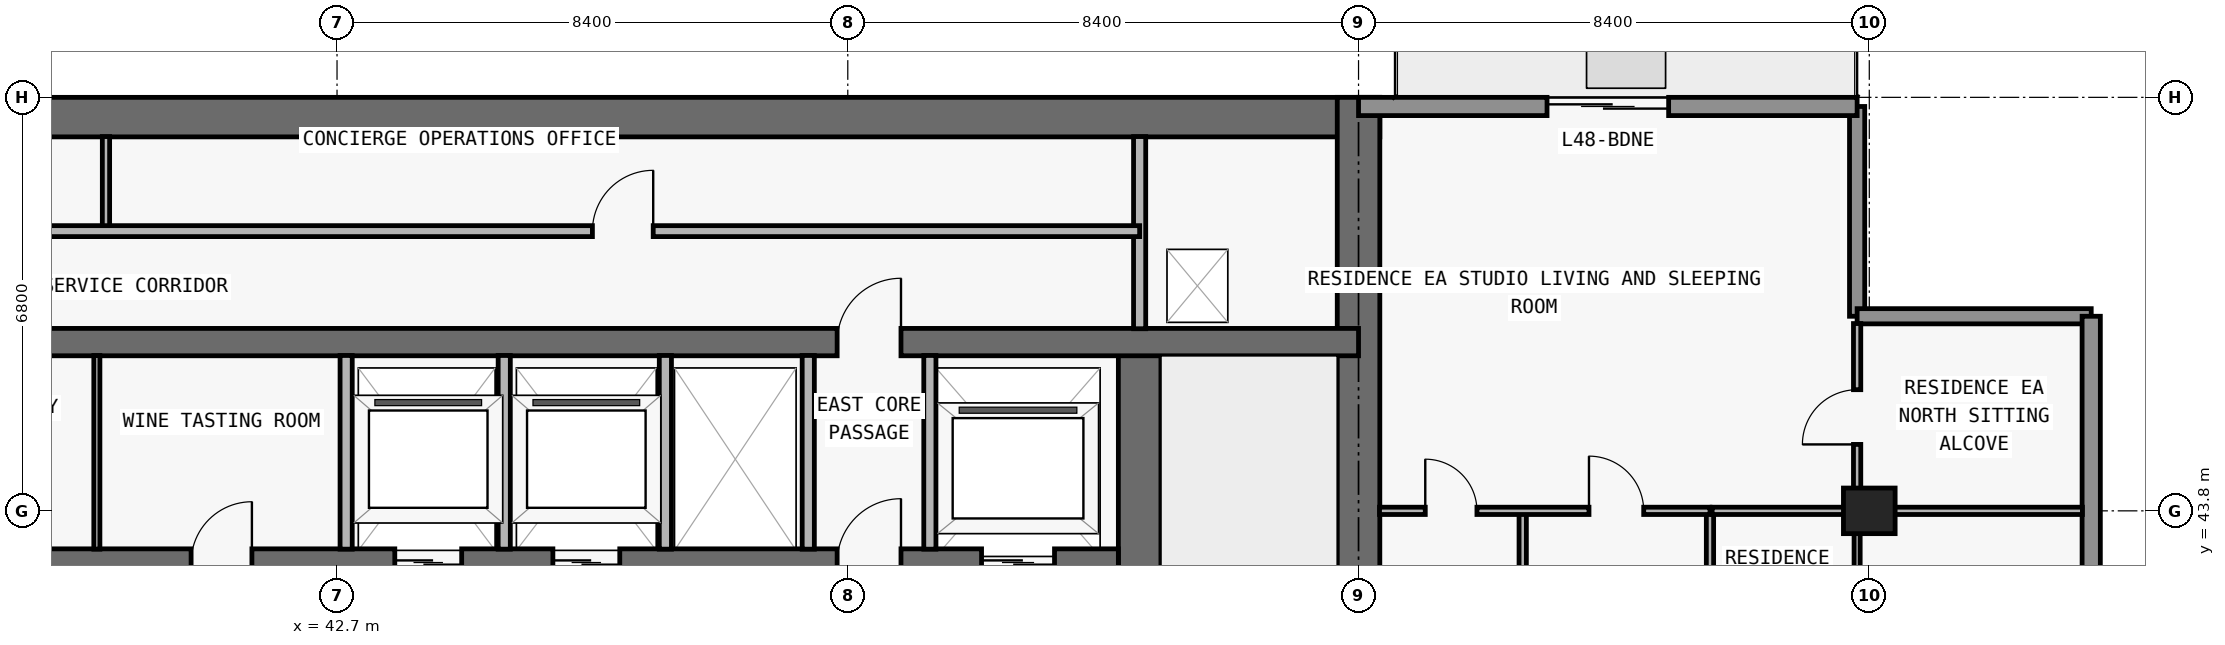
"""IFC4 building model, lengths in metres.
Left out: names, types, materials, properties, quantities, classifications, styles, units other than length and angle.
Written with IfcOpenShell. Run it as: python <this file> out.ifc"""

import sys

from ifc_helpers import new_model, si_unit, direction, frame, frame_2d, origin, origin_2d, place, context, subcontext, project, spatial, rectangle, extrude, element, fill, save


model = new_model("IFC4")
c1 = context("Model", 3, precision=1e-05, world=origin(), true_north=direction((0.0, 1.0)))
c2 = subcontext(c1, "Body", "Model", "MODEL_VIEW")
j1 = project(units=[si_unit("LENGTHUNIT", "METRE"), si_unit("PLANEANGLEUNIT", "RADIAN")], contexts=[c1])
p1 = place(None, origin())
s1 = spatial("IfcSite", under=j1, at=p1, CompositionType="ELEMENT")
p2 = place(p1, origin())
s2 = spatial("IfcBuilding", under=s1, at=p2, CompositionType="ELEMENT")
p3 = place(p2, frame((0.0, 0.0, 173.7)))
s3 = spatial("IfcBuildingStorey", under=s2, at=p3, CompositionType="ELEMENT", Elevation=173.7)
p4 = place(p3, frame((67.9, 43.8, 0.0), z_axis=(0.0, 0.0, 1.0), x_axis=(1.0, 0.0, 0.0)))
e1 = element("IfcColumn", 1, at=p4, inside=s3, PredefinedType="COLUMN", context=c2, shape_type="SweptSolid", body=[
    extrude(rectangle(XDim=0.85, YDim=0.75, at=origin_2d()), origin(), (0.0, 0.0, 1.0), 3.05),
])
p5 = place(p3, frame((17.95, 50.275, 0.0), z_axis=(0.0, 0.0, 1.0), x_axis=(1.0, 0.0, 0.0)))
e2 = element("IfcWall", 2, at=p5, inside=s3, PredefinedType="SHEAR", context=c2, shape_type="SweptSolid", body=[
    extrude(rectangle(XDim=41.9, YDim=0.65, at=frame_2d((20.95, 0.0))), origin(), (0.0, 0.0, 1.0), 3.05),
])
p6 = place(p3, frame((59.5, 36.65, 0.0), z_axis=(0.0, 0.0, 1.0), x_axis=(0.0, 1.0, 0.0)))
e3 = element("IfcWall", 3, at=p6, inside=s3, PredefinedType="SHEAR", context=c2, shape_type="SweptSolid", body=[
    extrude(rectangle(XDim=13.95, YDim=0.7, at=frame_2d((6.975, 0.0))), origin(), (0.0, 0.0, 1.0), 3.05),
])
p7 = place(p3, frame((55.9, 37.0, 0.0), z_axis=(0.0, 0.0, 1.0), x_axis=(0.0, 1.0, 0.0)))
e4 = element("IfcWall", 4, at=p7, inside=s3, PredefinedType="SHEAR", context=c2, shape_type="SweptSolid", body=[
    extrude(rectangle(XDim=9.575, YDim=0.7, at=frame_2d((4.788, 0.0))), origin(), (0.0, 0.0, 1.0), 3.05),
])
p8 = place(p7, frame((0.55, 0.0, 0.0)))
e5 = element("IfcOpeningElement", 5, at=p8, cuts=e4, PredefinedType="OPENING", context=c2, shape_type="SweptSolid", body=[
    extrude(rectangle(XDim=1.1, YDim=2.15, at=frame_2d((0.55, 1.075))), frame((0.0, 0.36, 0.0), z_axis=(0.0, -1.0, 0.0), x_axis=(1.0, 0.0, 0.0)), (0.0, 0.0, 1.0), 0.72),
])
p9 = place(p3, frame((22.25, 42.95, 0.0), z_axis=(0.0, 0.0, 1.0), x_axis=(1.0, 0.0, 0.0)))
e6 = element("IfcWall", 6, at=p9, inside=s3, PredefinedType="SHEAR", context=c2, shape_type="SweptSolid", body=[
    extrude(rectangle(XDim=33.3, YDim=0.45, at=frame_2d((16.65, 0.0))), origin(), (0.0, 0.0, 1.0), 3.05),
])
p10 = place(p9, frame((1.05, 0.0, 0.0)))
e7 = element("IfcOpeningElement", 7, at=p10, cuts=e6, PredefinedType="OPENING", context=c2, shape_type="SweptSolid", body=[
    extrude(rectangle(XDim=1.2, YDim=2.2, at=frame_2d((0.6, 1.1))), frame((0.0, 0.235, 0.0), z_axis=(0.0, -1.0, 0.0), x_axis=(1.0, 0.0, 0.0)), (0.0, 0.0, 1.0), 0.47),
])
p11 = place(p9, frame((31.05, 0.0, 0.0)))
e8 = element("IfcOpeningElement", 8, at=p11, cuts=e6, PredefinedType="OPENING", context=c2, shape_type="SweptSolid", body=[
    extrude(rectangle(XDim=1.2, YDim=2.2, at=frame_2d((0.6, 1.1))), frame((0.0, 0.235, 0.0), z_axis=(0.0, -1.0, 0.0), x_axis=(1.0, 0.0, 0.0)), (0.0, 0.0, 1.0), 0.47),
])
p12 = place(p9, frame((21.4, 0.0, 0.0)))
e9 = element("IfcOpeningElement", 9, at=p12, cuts=e6, PredefinedType="OPENING", context=c2, shape_type="SweptSolid", body=[
    extrude(rectangle(XDim=1.1, YDim=2.2, at=frame_2d((0.55, 1.1))), frame((0.0, 0.235, 0.0), z_axis=(0.0, -1.0, 0.0), x_axis=(1.0, 0.0, 0.0)), (0.0, 0.0, 1.0), 0.47),
])
p13 = place(p9, frame((24.0, 0.0, 0.0)))
e10 = element("IfcOpeningElement", 10, at=p13, cuts=e6, PredefinedType="OPENING", context=c2, shape_type="SweptSolid", body=[
    extrude(rectangle(XDim=1.1, YDim=2.2, at=frame_2d((0.55, 1.1))), frame((0.0, 0.235, 0.0), z_axis=(0.0, -1.0, 0.0), x_axis=(1.0, 0.0, 0.0)), (0.0, 0.0, 1.0), 0.47),
])
p14 = place(p9, frame((3.625, 0.0, 0.0)))
e11 = element("IfcOpeningElement", 11, at=p14, cuts=e6, PredefinedType="OPENING", context=c2, shape_type="SweptSolid", body=[
    extrude(rectangle(XDim=1.05, YDim=2.15, at=frame_2d((0.525, 1.075))), frame((0.0, 0.235, 0.0), z_axis=(0.0, -1.0, 0.0), x_axis=(1.0, 0.0, 0.0)), (0.0, 0.0, 1.0), 0.47),
])
p15 = place(p9, frame((28.675, 0.0, 0.0)))
e12 = element("IfcOpeningElement", 12, at=p15, cuts=e6, PredefinedType="OPENING", context=c2, shape_type="SweptSolid", body=[
    extrude(rectangle(XDim=1.05, YDim=2.15, at=frame_2d((0.525, 1.075))), frame((0.0, 0.235, 0.0), z_axis=(0.0, -1.0, 0.0), x_axis=(1.0, 0.0, 0.0)), (0.0, 0.0, 1.0), 0.47),
])
p16 = place(p9, frame((13.925, 0.0, 0.0)))
e13 = element("IfcOpeningElement", 13, at=p16, cuts=e6, PredefinedType="OPENING", context=c2, shape_type="SweptSolid", body=[
    extrude(rectangle(XDim=1.0, YDim=2.2, at=frame_2d((0.5, 1.1))), frame((0.0, 0.235, 0.0), z_axis=(0.0, -1.0, 0.0), x_axis=(1.0, 0.0, 0.0)), (0.0, 0.0, 1.0), 0.47),
])
p17 = place(p9, frame((18.05, 0.0, 0.0)))
e14 = element("IfcOpeningElement", 14, at=p17, cuts=e6, PredefinedType="OPENING", context=c2, shape_type="SweptSolid", body=[
    extrude(rectangle(XDim=1.0, YDim=2.2, at=frame_2d((0.5, 1.1))), frame((0.0, 0.235, 0.0), z_axis=(0.0, -1.0, 0.0), x_axis=(1.0, 0.0, 0.0)), (0.0, 0.0, 1.0), 0.47),
])
p18 = place(p3, frame((18.3, 46.575, 0.0), z_axis=(0.0, 0.0, 1.0), x_axis=(1.0, 0.0, 0.0)))
e15 = element("IfcWall", 15, at=p18, inside=s3, PredefinedType="SHEAR", context=c2, shape_type="SweptSolid", body=[
    extrude(rectangle(XDim=41.2, YDim=0.45, at=frame_2d((20.6, 0.0))), origin(), (0.0, 0.0, 1.0), 3.05),
])
p19 = place(p18, frame((7.575, 0.0, 0.0)))
e16 = element("IfcOpeningElement", 16, at=p19, cuts=e15, PredefinedType="OPENING", context=c2, shape_type="SweptSolid", body=[
    extrude(rectangle(XDim=1.05, YDim=2.15, at=frame_2d((0.525, 1.075))), frame((0.0, 0.235, 0.0), z_axis=(0.0, -1.0, 0.0), x_axis=(1.0, 0.0, 0.0)), (0.0, 0.0, 1.0), 0.47),
])
p20 = place(p18, frame((32.625, 0.0, 0.0)))
e17 = element("IfcOpeningElement", 17, at=p20, cuts=e15, PredefinedType="OPENING", context=c2, shape_type="SweptSolid", body=[
    extrude(rectangle(XDim=1.05, YDim=2.15, at=frame_2d((0.525, 1.075))), frame((0.0, 0.235, 0.0), z_axis=(0.0, -1.0, 0.0), x_axis=(1.0, 0.0, 0.0)), (0.0, 0.0, 1.0), 0.47),
])
p21 = place(p3, frame((67.7, 50.45, 0.0), z_axis=(0.0, 0.0, 1.0), x_axis=(0.0, -1.0, 0.0)))
e18 = element("IfcWall", 18, at=p21, inside=s3, PredefinedType="ELEMENTEDWALL", context=c2, shape_type="SweptSolid", body=[
    extrude(rectangle(XDim=3.45, YDim=0.25, at=frame_2d((1.725, 0.0))), origin(), (0.0, 0.0, 1.0), 3.05),
])
p22 = place(p3, frame((67.7, 47.0, 0.0), z_axis=(0.0, 0.0, 1.0), x_axis=(1.0, 0.0, 0.0)))
e19 = element("IfcWall", 19, at=p22, inside=s3, PredefinedType="ELEMENTEDWALL", context=c2, shape_type="SweptSolid", body=[
    extrude(rectangle(XDim=3.85, YDim=0.25, at=frame_2d((1.925, 0.0))), origin(), (0.0, 0.0, 1.0), 3.05),
])
p23 = place(p3, frame((71.55, 47.0, 0.0), z_axis=(0.0, 0.0, 1.0), x_axis=(0.0, -1.0, 0.0)))
e20 = element("IfcWall", 20, at=p23, inside=s3, PredefinedType="STANDARD", context=c2, shape_type="SweptSolid", body=[
    extrude(rectangle(XDim=17.9, YDim=0.3, at=frame_2d((8.95, 0.0))), origin(), (0.0, 0.0, 1.0), 3.05),
])
p24 = place(p3, frame((59.5, 50.45, 0.0), z_axis=(0.0, 0.0, 1.0), x_axis=(1.0, 0.0, 0.0)))
e21 = element("IfcWall", 21, at=p24, inside=s3, PredefinedType="STANDARD", context=c2, shape_type="SweptSolid", body=[
    extrude(rectangle(XDim=8.2, YDim=0.3, at=frame_2d((4.1, 0.0))), origin(), (0.0, 0.0, 1.0), 3.05),
])
p25 = place(p24, frame((3.1, 0.0, 0.0)))
e22 = element("IfcOpeningElement", 22, at=p25, cuts=e21, PredefinedType="OPENING", context=c2, shape_type="SweptSolid", body=[
    extrude(rectangle(XDim=2.0, YDim=2.3, at=frame_2d((1.0, 1.15))), frame((0.0, 0.16, 0.0), z_axis=(0.0, -1.0, 0.0), x_axis=(1.0, 0.0, 0.0)), (0.0, 0.0, 1.0), 0.32),
])
p26 = place(p3, frame((38.75, 43.17, 0.0), z_axis=(0.0, 0.0, 1.0), x_axis=(0.0, 1.0, 0.0)))
e23 = element("IfcWall", 23, at=p26, inside=s3, PredefinedType="MOVABLE", context=c2, shape_type="SweptSolid", body=[
    extrude(rectangle(XDim=3.185, YDim=0.1, at=frame_2d((1.593, 0.0))), origin(), (0.0, 0.0, 1.0), 3.05),
])
p27 = place(p3, frame((38.9, 48.4, 0.0), z_axis=(0.0, 0.0, 1.0), x_axis=(0.0, 1.0, 0.0)))
e24 = element("IfcWall", 24, at=p27, inside=s3, PredefinedType="PARTITIONING", context=c2, shape_type="SweptSolid", body=[
    extrude(rectangle(XDim=1.555, YDim=0.12, at=frame_2d((0.778, 0.0))), origin(), (0.0, 0.0, 1.0), 3.05),
])
for number, where, z_axis, x_axis in (
    (25, (42.85, 43.17, 0.0), (0.0, 0.0, 1.0), (0.0, 1.0, 0.0)),
    (26, (45.45, 43.17, 0.0), (0.0, 0.0, 1.0), (0.0, 1.0, 0.0)),
    (27, (48.1, 43.17, 0.0), (0.0, 0.0, 1.0), (0.0, 1.0, 0.0)),
    (28, (50.45, 43.17, 0.0), (0.0, 0.0, 1.0), (0.0, 1.0, 0.0)),
    (29, (52.45, 43.17, 0.0), (0.0, 0.0, 1.0), (0.0, 1.0, 0.0)),
):
    element("IfcWall", number, at=place(p3, frame(where, z_axis=z_axis, x_axis=x_axis)), inside=s3, PredefinedType="PARTITIONING", context=c2, shape_type="SweptSolid", body=[
        extrude(rectangle(XDim=3.185, YDim=0.2, at=frame_2d((1.593, 0.0))), origin(), (0.0, 0.0, 1.0), 3.05),
    ])
p28 = place(p3, frame((55.9, 46.795, 0.0), z_axis=(0.0, 0.0, 1.0), x_axis=(0.0, 1.0, 0.0)))
e30 = element("IfcWall", 30, at=p28, inside=s3, PredefinedType="PARTITIONING", context=c2, shape_type="SweptSolid", body=[
    extrude(rectangle(XDim=3.16, YDim=0.2, at=frame_2d((1.58, 0.0))), origin(), (0.0, 0.0, 1.0), 3.05),
])
p29 = place(p3, frame((62.2, 37.0, 0.0), z_axis=(0.0, 0.0, 1.0), x_axis=(0.0, 1.0, 0.0)))
e31 = element("IfcWall", 31, at=p29, inside=s3, PredefinedType="PARTITIONING", context=c2, shape_type="SweptSolid", body=[
    extrude(rectangle(XDim=6.8, YDim=0.12, at=frame_2d((3.4, 0.0))), origin(), (0.0, 0.0, 1.0), 2.578),
])
p30 = place(p29, frame((1.194, 0.0, 0.0)))
e32 = element("IfcOpeningElement", 32, at=p30, cuts=e31, PredefinedType="OPENING", context=c2, shape_type="SweptSolid", body=[
    extrude(rectangle(XDim=0.85, YDim=2.1, at=frame_2d((0.425, 1.05))), frame((0.0, 0.07, 0.0), z_axis=(0.0, -1.0, 0.0), x_axis=(1.0, 0.0, 0.0)), (0.0, 0.0, 1.0), 0.14),
])
p31 = place(p3, frame((65.28, 37.0, 0.0), z_axis=(0.0, 0.0, 1.0), x_axis=(0.0, 1.0, 0.0)))
e33 = element("IfcWall", 33, at=p31, inside=s3, PredefinedType="PARTITIONING", context=c2, shape_type="SweptSolid", body=[
    extrude(rectangle(XDim=6.8, YDim=0.12, at=frame_2d((3.4, 0.0))), origin(), (0.0, 0.0, 1.0), 2.679),
])
p32 = place(p31, frame((2.95, 0.0, 0.0)))
e34 = element("IfcOpeningElement", 34, at=p32, cuts=e33, PredefinedType="OPENING", context=c2, shape_type="SweptSolid", body=[
    extrude(rectangle(XDim=0.9, YDim=2.15, at=frame_2d((0.45, 1.075))), frame((0.0, 0.07, 0.0), z_axis=(0.0, -1.0, 0.0), x_axis=(1.0, 0.0, 0.0)), (0.0, 0.0, 1.0), 0.14),
])
p33 = place(p3, frame((67.7, 37.0, 0.0), z_axis=(0.0, 0.0, 1.0), x_axis=(0.0, 1.0, 0.0)))
e35 = element("IfcWall", 35, at=p33, inside=s3, PredefinedType="MOVABLE", context=c2, shape_type="SweptSolid", body=[
    extrude(rectangle(XDim=6.8, YDim=0.1, at=frame_2d((3.4, 0.0))), origin(), (0.0, 0.0, 1.0), 2.263),
])
p34 = place(p33, frame((2.95, 0.0, 0.0)))
e36 = element("IfcOpeningElement", 36, at=p34, cuts=e35, PredefinedType="OPENING", context=c2, shape_type="SweptSolid", body=[
    extrude(rectangle(XDim=0.9, YDim=2.15, at=frame_2d((0.45, 1.075))), frame((0.0, 0.06, 0.0), z_axis=(0.0, -1.0, 0.0), x_axis=(1.0, 0.0, 0.0)), (0.0, 0.0, 1.0), 0.12),
])
p35 = place(p3, frame((67.7, 43.805, 0.0), z_axis=(0.0, 0.0, 1.0), x_axis=(0.0, 1.0, 0.0)))
e37 = element("IfcWall", 37, at=p35, inside=s3, PredefinedType="PARTITIONING", context=c2, shape_type="SweptSolid", body=[
    extrude(rectangle(XDim=3.075, YDim=0.12, at=frame_2d((1.538, 0.0))), origin(), (0.0, 0.0, 1.0), 3.05),
])
p36 = place(p35, frame((1.087, 0.0, 0.0)))
e38 = element("IfcOpeningElement", 38, at=p36, cuts=e37, PredefinedType="OPENING", context=c2, shape_type="SweptSolid", body=[
    extrude(rectangle(XDim=0.9, YDim=2.15, at=frame_2d((0.45, 1.075))), frame((0.0, 0.07, 0.0), z_axis=(0.0, -1.0, 0.0), x_axis=(1.0, 0.0, 0.0)), (0.0, 0.0, 1.0), 0.14),
])
p37 = place(p3, frame((59.845, 43.8, 0.0), z_axis=(0.0, 0.0, 1.0), x_axis=(1.0, 0.0, 0.0)))
e39 = element("IfcWall", 39, at=p37, inside=s3, PredefinedType="PARTITIONING", context=c2, shape_type="SweptSolid", body=[
    extrude(rectangle(XDim=5.435, YDim=0.12, at=frame_2d((2.718, 0.0))), origin(), (0.0, 0.0, 1.0), 2.418),
])
p38 = place(p37, frame((3.445, 0.0, 0.0)))
e40 = element("IfcOpeningElement", 40, at=p38, cuts=e39, PredefinedType="OPENING", context=c2, shape_type="SweptSolid", body=[
    extrude(rectangle(XDim=0.9, YDim=2.15, at=frame_2d((0.45, 1.075))), frame((0.0, 0.07, 0.0), z_axis=(0.0, -1.0, 0.0), x_axis=(1.0, 0.0, 0.0)), (0.0, 0.0, 1.0), 0.14),
])
p39 = place(p37, frame((0.752, 0.0, 0.0)))
e41 = element("IfcOpeningElement", 41, at=p39, cuts=e39, PredefinedType="OPENING", context=c2, shape_type="SweptSolid", body=[
    extrude(rectangle(XDim=0.85, YDim=2.1, at=frame_2d((0.425, 1.05))), frame((0.0, 0.07, 0.0), z_axis=(0.0, -1.0, 0.0), x_axis=(1.0, 0.0, 0.0)), (0.0, 0.0, 1.0), 0.14),
])
p40 = place(p3, frame((65.316, 43.8, 0.0), z_axis=(0.0, 0.0, 1.0), x_axis=(1.0, 0.0, 0.0)))
e42 = element("IfcWall", 42, at=p40, inside=s3, PredefinedType="PARTITIONING", context=c2, shape_type="SweptSolid", body=[
    extrude(rectangle(XDim=6.089, YDim=0.12, at=frame_2d((3.044, 0.0))), origin(), (0.0, 0.0, 1.0), 2.418),
])
p41 = place(p3, frame((21.9, 48.4, 0.0), z_axis=(0.0, 0.0, 1.0), x_axis=(1.0, 0.0, 0.0)))
e43 = element("IfcWall", 43, at=p41, inside=s3, PredefinedType="PARTITIONING", context=c2, shape_type="SweptSolid", body=[
    extrude(rectangle(XDim=34.0, YDim=0.18, at=frame_2d((17.0, 0.0))), origin(), (0.0, 0.0, 1.0), 3.05),
])
p42 = place(p41, frame((8.0, 0.0, 0.0)))
e44 = element("IfcOpeningElement", 44, at=p42, cuts=e43, PredefinedType="OPENING", context=c2, shape_type="SweptSolid", body=[
    extrude(rectangle(XDim=1.0, YDim=2.2, at=frame_2d((0.5, 1.1))), frame((0.0, 0.1, 0.0), z_axis=(0.0, -1.0, 0.0), x_axis=(1.0, 0.0, 0.0)), (0.0, 0.0, 1.0), 0.2),
])
p43 = place(p41, frame((25.0, 0.0, 0.0)))
e45 = element("IfcOpeningElement", 45, at=p43, cuts=e43, PredefinedType="OPENING", context=c2, shape_type="SweptSolid", body=[
    extrude(rectangle(XDim=1.0, YDim=2.2, at=frame_2d((0.5, 1.1))), frame((0.0, 0.1, 0.0), z_axis=(0.0, -1.0, 0.0), x_axis=(1.0, 0.0, 0.0)), (0.0, 0.0, 1.0), 0.2),
])
p44 = place(p25, origin())
e46 = element("IfcDoor", 46, at=p44, inside=s3, OperationType="DOUBLE_DOOR_SLIDING", PredefinedType="DOOR", context=c2, shape_type="SweptSolid", body=[
    extrude(rectangle(XDim=2.0, YDim=2.3, at=frame_2d((1.0, 1.15))), frame((0.0, 0.025, 0.0), z_axis=(0.0, -1.0, 0.0), x_axis=(1.0, 0.0, 0.0)), (0.0, 0.0, 1.0), 0.05),
])
fill(e22, e46)
p45 = place(p11, origin())
e47 = element("IfcDoor", 47, at=p45, inside=s3, OperationType="DOUBLE_DOOR_SLIDING", PredefinedType="DOOR", context=c2, shape_type="SweptSolid", body=[
    extrude(rectangle(XDim=1.2, YDim=2.2, at=frame_2d((0.6, 1.1))), frame((0.0, 0.025, 0.0), z_axis=(0.0, -1.0, 0.0), x_axis=(1.0, 0.0, 0.0)), (0.0, 0.0, 1.0), 0.05),
])
fill(e8, e47)
p46 = place(p12, origin())
e48 = element("IfcDoor", 48, at=p46, inside=s3, OperationType="DOUBLE_DOOR_SLIDING", PredefinedType="DOOR", context=c2, shape_type="SweptSolid", body=[
    extrude(rectangle(XDim=1.1, YDim=2.2, at=frame_2d((0.55, 1.1))), frame((0.0, 0.025, 0.0), z_axis=(0.0, -1.0, 0.0), x_axis=(1.0, 0.0, 0.0)), (0.0, 0.0, 1.0), 0.05),
])
fill(e9, e48)
p47 = place(p13, origin())
e49 = element("IfcDoor", 49, at=p47, inside=s3, OperationType="DOUBLE_DOOR_SLIDING", PredefinedType="DOOR", context=c2, shape_type="SweptSolid", body=[
    extrude(rectangle(XDim=1.1, YDim=2.2, at=frame_2d((0.55, 1.1))), frame((0.0, 0.025, 0.0), z_axis=(0.0, -1.0, 0.0), x_axis=(1.0, 0.0, 0.0)), (0.0, 0.0, 1.0), 0.05),
])
fill(e10, e49)
p48 = place(p15, origin())
e50 = element("IfcDoor", 50, at=p48, inside=s3, OperationType="SINGLE_SWING_RIGHT", PredefinedType="DOOR", context=c2, shape_type="SweptSolid", body=[
    extrude(rectangle(XDim=1.05, YDim=2.15, at=frame_2d((0.525, 1.075))), frame((0.0, 0.025, 0.0), z_axis=(0.0, -1.0, 0.0), x_axis=(1.0, 0.0, 0.0)), (0.0, 0.0, 1.0), 0.05),
])
fill(e12, e50)
p49 = place(p17, origin())
e51 = element("IfcDoor", 51, at=p49, inside=s3, OperationType="SINGLE_SWING_RIGHT", PredefinedType="DOOR", context=c2, shape_type="SweptSolid", body=[
    extrude(rectangle(XDim=1.0, YDim=2.2, at=frame_2d((0.5, 1.1))), frame((0.0, 0.025, 0.0), z_axis=(0.0, -1.0, 0.0), x_axis=(1.0, 0.0, 0.0)), (0.0, 0.0, 1.0), 0.05),
])
fill(e14, e51)
p50 = place(p20, origin())
e52 = element("IfcDoor", 52, at=p50, inside=s3, OperationType="SINGLE_SWING_RIGHT", PredefinedType="DOOR", context=c2, shape_type="SweptSolid", body=[
    extrude(rectangle(XDim=1.05, YDim=2.15, at=frame_2d((0.525, 1.075))), frame((0.0, 0.025, 0.0), z_axis=(0.0, -1.0, 0.0), x_axis=(1.0, 0.0, 0.0)), (0.0, 0.0, 1.0), 0.05),
])
fill(e17, e52)
p51 = place(p43, origin())
e53 = element("IfcDoor", 53, at=p51, inside=s3, OperationType="SINGLE_SWING_RIGHT", PredefinedType="DOOR", context=c2, shape_type="SweptSolid", body=[
    extrude(rectangle(XDim=1.0, YDim=2.2, at=frame_2d((0.5, 1.1))), frame((0.0, 0.025, 0.0), z_axis=(0.0, -1.0, 0.0), x_axis=(1.0, 0.0, 0.0)), (0.0, 0.0, 1.0), 0.05),
])
fill(e45, e53)
p52 = place(p38, origin())
e54 = element("IfcDoor", 54, at=p52, inside=s3, OperationType="SINGLE_SWING_LEFT", PredefinedType="DOOR", context=c2, shape_type="SweptSolid", body=[
    extrude(rectangle(XDim=0.9, YDim=2.15, at=frame_2d((0.45, 1.075))), frame((0.0, 0.025, 0.0), z_axis=(0.0, -1.0, 0.0), x_axis=(1.0, 0.0, 0.0)), (0.0, 0.0, 1.0), 0.05),
])
fill(e40, e54)
p53 = place(p39, origin())
e55 = element("IfcDoor", 55, at=p53, inside=s3, OperationType="SINGLE_SWING_LEFT", PredefinedType="DOOR", context=c2, shape_type="SweptSolid", body=[
    extrude(rectangle(XDim=0.85, YDim=2.1, at=frame_2d((0.425, 1.05))), frame((0.0, 0.025, 0.0), z_axis=(0.0, -1.0, 0.0), x_axis=(1.0, 0.0, 0.0)), (0.0, 0.0, 1.0), 0.05),
])
fill(e41, e55)
p54 = place(p36, origin())
e56 = element("IfcDoor", 56, at=p54, inside=s3, OperationType="SINGLE_SWING_LEFT", PredefinedType="DOOR", context=c2, shape_type="SweptSolid", body=[
    extrude(rectangle(XDim=0.9, YDim=2.15, at=frame_2d((0.45, 1.075))), frame((0.0, 0.025, 0.0), z_axis=(0.0, -1.0, 0.0), x_axis=(1.0, 0.0, 0.0)), (0.0, 0.0, 1.0), 0.05),
])
fill(e38, e56)
save(model, sys.argv[1])
